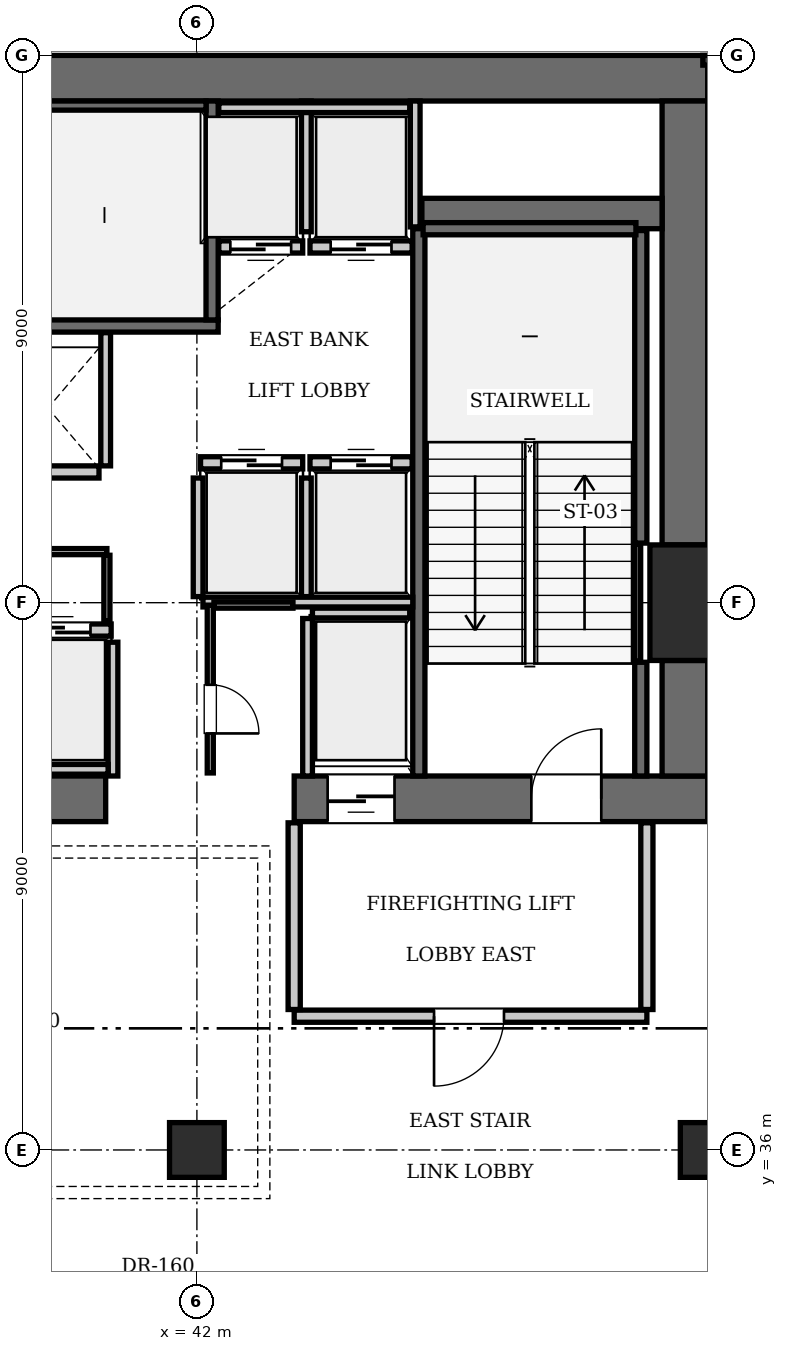
"""IFC4 building model, lengths in metres.
Left out: names, types, materials, properties, quantities, classifications, styles, units other than length and angle.
Written with IfcOpenShell. Run it as: python <this file> out.ifc"""

import sys

from ifc_helpers import new_model, si_unit, direction, frame, frame_2d, origin, origin_2d, place, context, subcontext, project, spatial, rectangle, extrude, element, fill, save


model = new_model("IFC4")
c1 = context("Model", 3, precision=1e-05, world=origin(), true_north=direction((0.0, 1.0)))
c2 = subcontext(c1, "Body", "Model", "MODEL_VIEW")
j1 = project(units=[si_unit("LENGTHUNIT", "METRE"), si_unit("PLANEANGLEUNIT", "RADIAN")], contexts=[c1])
p1 = place(None, origin())
s1 = spatial("IfcSite", under=j1, at=p1, CompositionType="ELEMENT")
p2 = place(p1, origin())
s2 = spatial("IfcBuilding", under=s1, at=p2, CompositionType="ELEMENT")
p3 = place(p2, frame((0.0, 0.0, 122.5)))
s3 = spatial("IfcBuildingStorey", under=s2, at=p3, CompositionType="ELEMENT", Elevation=122.5)
p4 = place(p3, frame((50.4, 45.0, 0.0), z_axis=(0.0, 0.0, 1.0), x_axis=(1.0, 0.0, 0.0)))
e1 = element("IfcColumn", 1, at=p4, inside=s3, PredefinedType="COLUMN", context=c2, shape_type="SweptSolid", body=[
    extrude(rectangle(XDim=1.9, YDim=1.9, at=origin_2d()), origin(), (0.0, 0.0, 1.0), 4.9),
])
p5 = place(p3, frame((25.2, 53.625, 0.0), z_axis=(0.0, 0.0, 1.0), x_axis=(1.0, 0.0, 0.0)))
e2 = element("IfcWall", 2, at=p5, inside=s3, PredefinedType="SHEAR", context=c2, shape_type="SweptSolid", body=[
    extrude(rectangle(XDim=25.2, YDim=0.75, at=frame_2d((12.6, 0.0))), origin(), (0.0, 0.0, 1.0), 4.9),
])
p6 = place(p3, frame((35.1, 41.775, 0.0), z_axis=(0.0, 0.0, 1.0), x_axis=(1.0, 0.0, 0.0)))
e3 = element("IfcWall", 3, at=p6, inside=s3, PredefinedType="SHEAR", context=c2, shape_type="SweptSolid", body=[
    extrude(rectangle(XDim=5.4, YDim=0.75, at=frame_2d((2.7, 0.0))), origin(), (0.0, 0.0, 1.0), 4.9),
])
p7 = place(p3, frame((43.6, 41.775, 0.0), z_axis=(0.0, 0.0, 1.0), x_axis=(1.0, 0.0, 0.0)))
e4 = element("IfcWall", 4, at=p7, inside=s3, PredefinedType="SHEAR", context=c2, shape_type="SweptSolid", body=[
    extrude(rectangle(XDim=6.8, YDim=0.75, at=frame_2d((3.4, 0.0))), origin(), (0.0, 0.0, 1.0), 4.9),
])
p8 = place(p7, frame((3.9, 0.0, 0.0)))
e5 = element("IfcOpeningElement", 5, at=p8, cuts=e4, PredefinedType="OPENING", context=c2, shape_type="SweptSolid", body=[
    extrude(rectangle(XDim=1.15, YDim=2.15, at=frame_2d((0.575, 1.075))), frame((0.0, 0.385, 0.0), z_axis=(0.0, -1.0, 0.0), x_axis=(1.0, 0.0, 0.0)), (0.0, 0.0, 1.0), 0.77),
])
p9 = place(p7, frame((0.55, 0.0, 0.0)))
e6 = element("IfcOpeningElement", 6, at=p9, cuts=e4, PredefinedType="OPENING", context=c2, shape_type="SweptSolid", body=[
    extrude(rectangle(XDim=1.1, YDim=2.2, at=frame_2d((0.55, 1.1))), frame((0.0, 0.385, 0.0), z_axis=(0.0, -1.0, 0.0), x_axis=(1.0, 0.0, 0.0)), (0.0, 0.0, 1.0), 0.77),
])
p10 = place(p3, frame((50.025, 42.15, 0.0), z_axis=(0.0, 0.0, 1.0), x_axis=(0.0, 1.0, 0.0)))
e7 = element("IfcWall", 7, at=p10, inside=s3, PredefinedType="SHEAR", context=c2, shape_type="SweptSolid", body=[
    extrude(rectangle(XDim=1.9, YDim=0.75, at=frame_2d((0.95, 0.0))), origin(), (0.0, 0.0, 1.0), 4.9),
])
p11 = place(p3, frame((50.025, 45.95, 0.0), z_axis=(0.0, 0.0, 1.0), x_axis=(0.0, 1.0, 0.0)))
e8 = element("IfcWall", 8, at=p11, inside=s3, PredefinedType="SHEAR", context=c2, shape_type="SweptSolid", body=[
    extrude(rectangle(XDim=7.3, YDim=0.75, at=frame_2d((3.65, 0.0))), origin(), (0.0, 0.0, 1.0), 4.9),
])
p12 = place(p3, frame((45.7, 51.4, 0.0), z_axis=(0.0, 0.0, 1.0), x_axis=(1.0, 0.0, 0.0)))
e9 = element("IfcWall", 9, at=p12, inside=s3, PredefinedType="SHEAR", context=c2, shape_type="SweptSolid", body=[
    extrude(rectangle(XDim=3.95, YDim=0.5, at=frame_2d((1.975, 0.0))), origin(), (0.0, 0.0, 1.0), 4.9),
])
for number, where, z_axis, x_axis in (
    (10, (42.0, 36.0, 0.0), (0.0, 0.0, 1.0), (1.0, 0.0, 0.0)),
    (11, (50.4, 36.0, 0.0), (0.0, 0.0, 1.0), (1.0, 0.0, 0.0)),
):
    element("IfcColumn", number, at=place(p3, frame(where, z_axis=z_axis, x_axis=x_axis)), inside=s3, PredefinedType="COLUMN", context=c2, shape_type="SweptSolid", body=[
        extrude(rectangle(XDim=0.9, YDim=0.9, at=origin_2d()), origin(), (0.0, 0.0, 1.0), 4.9),
    ])
p13 = place(p3, frame((33.25, 49.55, 0.0), z_axis=(0.0, 0.0, 1.0), x_axis=(1.0, 0.0, 0.0)))
e12 = element("IfcWall", 12, at=p13, inside=s3, PredefinedType="SOLIDWALL", context=c2, shape_type="SweptSolid", body=[
    extrude(rectangle(XDim=9.1, YDim=0.2, at=frame_2d((4.55, 0.0))), origin(), (0.0, 0.0, 1.0), 4.66),
])
p14 = place(p3, frame((42.25, 49.65, 0.0), z_axis=(0.0, 0.0, 1.0), x_axis=(0.0, 1.0, 0.0)))
e13 = element("IfcWall", 13, at=p14, inside=s3, PredefinedType="SOLIDWALL", context=c2, shape_type="SweptSolid", body=[
    extrude(rectangle(XDim=3.6, YDim=0.2, at=frame_2d((1.8, 0.0))), origin(), (0.0, 0.0, 1.0), 4.66),
])
p15 = place(p3, frame((33.45, 53.175, 0.0), z_axis=(0.0, 0.0, 1.0), x_axis=(1.0, 0.0, 0.0)))
e14 = element("IfcWall", 14, at=p15, inside=s3, PredefinedType="SOLIDWALL", context=c2, shape_type="SweptSolid", body=[
    extrude(rectangle(XDim=8.7, YDim=0.15, at=frame_2d((4.35, 0.0))), origin(), (0.0, 0.0, 1.0), 4.66),
])
p16 = place(p3, frame((45.65, 42.15, 0.0), z_axis=(0.0, 0.0, 1.0), x_axis=(0.0, 1.0, 0.0)))
e15 = element("IfcWall", 15, at=p16, inside=s3, PredefinedType="SOLIDWALL", context=c2, shape_type="SweptSolid", body=[
    extrude(rectangle(XDim=9.0, YDim=0.2, at=frame_2d((4.5, 0.0))), origin(), (0.0, 0.0, 1.0), 4.66),
])
p17 = place(p3, frame((49.3, 42.15, 0.0), z_axis=(0.0, 0.0, 1.0), x_axis=(0.0, 1.0, 0.0)))
e16 = element("IfcWall", 16, at=p17, inside=s3, PredefinedType="SOLIDWALL", context=c2, shape_type="SweptSolid", body=[
    extrude(rectangle(XDim=1.87, YDim=0.2, at=frame_2d((0.935, 0.0))), origin(), (0.0, 0.0, 1.0), 4.66),
])
p18 = place(p3, frame((49.3, 45.98, 0.0), z_axis=(0.0, 0.0, 1.0), x_axis=(0.0, 1.0, 0.0)))
e17 = element("IfcWall", 17, at=p18, inside=s3, PredefinedType="SOLIDWALL", context=c2, shape_type="SweptSolid", body=[
    extrude(rectangle(XDim=5.14, YDim=0.2, at=frame_2d((2.57, 0.0))), origin(), (0.0, 0.0, 1.0), 4.66),
])
p19 = place(p3, frame((45.72, 51.15, 0.0), z_axis=(0.0, 0.0, 1.0), x_axis=(1.0, 0.0, 0.0)))
e18 = element("IfcWall", 18, at=p19, inside=s3, PredefinedType="SOLIDWALL", context=c2, shape_type="SweptSolid", body=[
    extrude(rectangle(XDim=3.5, YDim=0.2, at=frame_2d((1.75, 0.0))), origin(), (0.0, 0.0, 1.0), 4.66),
])
p20 = place(p3, frame((49.248, 44.04, 0.0), z_axis=(0.0, 0.0, 1.0), x_axis=(0.0, 1.0, 0.0)))
e19 = element("IfcWall", 19, at=p20, inside=s3, PredefinedType="SOLIDWALL", context=c2, shape_type="SweptSolid", body=[
    extrude(rectangle(XDim=1.92, YDim=0.1, at=frame_2d((0.96, 0.0))), origin(), (0.0, 0.0, 1.0), 4.66),
])
p21 = place(p3, frame((42.06, 47.3, 0.0), z_axis=(0.0, 0.0, 1.0), x_axis=(1.0, 0.0, 0.0)))
e20 = element("IfcWall", 20, at=p21, inside=s3, PredefinedType="SOLIDWALL", context=c2, shape_type="SweptSolid", body=[
    extrude(rectangle(XDim=1.68, YDim=0.2, at=frame_2d((0.84, 0.0))), origin(), (0.0, 0.0, 1.0), 4.66),
])
p22 = place(p21, frame((0.34, 0.0, 0.0)))
e21 = element("IfcOpeningElement", 21, at=p22, cuts=e20, PredefinedType="OPENING", context=c2, shape_type="SweptSolid", body=[
    extrude(rectangle(XDim=1.0, YDim=2.15, at=frame_2d((0.5, 1.075))), frame((0.0, 0.11, 0.0), z_axis=(0.0, -1.0, 0.0), x_axis=(1.0, 0.0, 0.0)), (0.0, 0.0, 1.0), 0.22),
])
p23 = place(p3, frame((43.86, 47.3, 0.0), z_axis=(0.0, 0.0, 1.0), x_axis=(1.0, 0.0, 0.0)))
e22 = element("IfcWall", 22, at=p23, inside=s3, PredefinedType="SOLIDWALL", context=c2, shape_type="SweptSolid", body=[
    extrude(rectangle(XDim=1.68, YDim=0.2, at=frame_2d((0.84, 0.0))), origin(), (0.0, 0.0, 1.0), 4.66),
])
p24 = place(p23, frame((0.34, 0.0, 0.0)))
e23 = element("IfcOpeningElement", 23, at=p24, cuts=e22, PredefinedType="OPENING", context=c2, shape_type="SweptSolid", body=[
    extrude(rectangle(XDim=1.0, YDim=2.15, at=frame_2d((0.5, 1.075))), frame((0.0, 0.11, 0.0), z_axis=(0.0, -1.0, 0.0), x_axis=(1.0, 0.0, 0.0)), (0.0, 0.0, 1.0), 0.22),
])
p25 = place(p3, frame((42.36, 50.85, 0.0), z_axis=(0.0, 0.0, 1.0), x_axis=(1.0, 0.0, 0.0)))
e24 = element("IfcWall", 24, at=p25, inside=s3, PredefinedType="SOLIDWALL", context=c2, shape_type="SweptSolid", body=[
    extrude(rectangle(XDim=1.38, YDim=0.2, at=frame_2d((0.69, 0.0))), origin(), (0.0, 0.0, 1.0), 4.66),
])
p26 = place(p25, frame((0.19, 0.0, 0.0)))
e25 = element("IfcOpeningElement", 25, at=p26, cuts=e24, PredefinedType="OPENING", context=c2, shape_type="SweptSolid", body=[
    extrude(rectangle(XDim=1.0, YDim=2.15, at=frame_2d((0.5, 1.075))), frame((0.0, 0.11, 0.0), z_axis=(0.0, -1.0, 0.0), x_axis=(1.0, 0.0, 0.0)), (0.0, 0.0, 1.0), 0.22),
])
p27 = place(p3, frame((43.86, 50.85, 0.0), z_axis=(0.0, 0.0, 1.0), x_axis=(1.0, 0.0, 0.0)))
e26 = element("IfcWall", 26, at=p27, inside=s3, PredefinedType="SOLIDWALL", context=c2, shape_type="SweptSolid", body=[
    extrude(rectangle(XDim=1.68, YDim=0.2, at=frame_2d((0.84, 0.0))), origin(), (0.0, 0.0, 1.0), 4.66),
])
p28 = place(p27, frame((0.34, 0.0, 0.0)))
e27 = element("IfcOpeningElement", 27, at=p28, cuts=e26, PredefinedType="OPENING", context=c2, shape_type="SweptSolid", body=[
    extrude(rectangle(XDim=1.0, YDim=2.15, at=frame_2d((0.5, 1.075))), frame((0.0, 0.11, 0.0), z_axis=(0.0, -1.0, 0.0), x_axis=(1.0, 0.0, 0.0)), (0.0, 0.0, 1.0), 0.22),
])
p29 = place(p3, frame((38.91, 44.55, 0.0), z_axis=(0.0, 0.0, 1.0), x_axis=(1.0, 0.0, 0.0)))
e28 = element("IfcWall", 28, at=p29, inside=s3, PredefinedType="SOLIDWALL", context=c2, shape_type="SweptSolid", body=[
    extrude(rectangle(XDim=1.68, YDim=0.2, at=frame_2d((0.84, 0.0))), origin(), (0.0, 0.0, 1.0), 4.66),
])
p30 = place(p29, frame((0.34, 0.0, 0.0)))
e29 = element("IfcOpeningElement", 29, at=p30, cuts=e28, PredefinedType="OPENING", context=c2, shape_type="SweptSolid", body=[
    extrude(rectangle(XDim=1.0, YDim=2.15, at=frame_2d((0.5, 1.075))), frame((0.0, 0.11, 0.0), z_axis=(0.0, -1.0, 0.0), x_axis=(1.0, 0.0, 0.0)), (0.0, 0.0, 1.0), 0.22),
])
p31 = place(p3, frame((38.71, 47.15, 0.0), z_axis=(0.0, 0.0, 1.0), x_axis=(1.0, 0.0, 0.0)))
e30 = element("IfcWall", 30, at=p31, inside=s3, PredefinedType="SOLIDWALL", context=c2, shape_type="SweptSolid", body=[
    extrude(rectangle(XDim=1.68, YDim=0.2, at=frame_2d((0.84, 0.0))), origin(), (0.0, 0.0, 1.0), 4.66),
])
p32 = place(p3, frame((43.9, 44.83, 0.0), z_axis=(0.0, 0.0, 1.0), x_axis=(1.0, 0.0, 0.0)))
e31 = element("IfcWall", 31, at=p32, inside=s3, PredefinedType="SOLIDWALL", context=c2, shape_type="SweptSolid", body=[
    extrude(rectangle(XDim=1.6, YDim=0.16, at=frame_2d((0.8, 0.0))), origin(), (0.0, 0.0, 1.0), 4.66),
])
p33 = place(p3, frame((43.82, 42.15, 0.0), z_axis=(0.0, 0.0, 1.0), x_axis=(0.0, 1.0, 0.0)))
e32 = element("IfcWall", 32, at=p33, inside=s3, PredefinedType="SOLIDWALL", context=c2, shape_type="SweptSolid", body=[
    extrude(rectangle(XDim=2.59, YDim=0.16, at=frame_2d((1.295, 0.0))), origin(), (0.0, 0.0, 1.0), 4.66),
])
for number, where, z_axis, x_axis in (
    (33, (42.02, 45.1, 0.0), (0.0, 0.0, 1.0), (0.0, 1.0, 0.0)),
    (34, (43.8, 45.1, 0.0), (0.0, 0.0, 1.0), (0.0, 1.0, 0.0)),
):
    element("IfcWall", number, at=place(p3, frame(where, z_axis=z_axis, x_axis=x_axis)), inside=s3, PredefinedType="SOLIDWALL", context=c2, shape_type="SweptSolid", body=[
        extrude(rectangle(XDim=1.95, YDim=0.16, at=frame_2d((0.975, 0.0))), origin(), (0.0, 0.0, 1.0), 4.66),
    ])
p34 = place(p3, frame((42.1, 45.01, 0.0), z_axis=(0.0, 0.0, 1.0), x_axis=(1.0, 0.0, 0.0)))
e35 = element("IfcWall", 35, at=p34, inside=s3, PredefinedType="SOLIDWALL", context=c2, shape_type="SweptSolid", body=[
    extrude(rectangle(XDim=3.45, YDim=0.16, at=frame_2d((1.725, 0.0))), origin(), (0.0, 0.0, 1.0), 4.66),
])
p35 = place(p3, frame((45.59, 51.18, 0.0), z_axis=(0.0, 0.0, 1.0), x_axis=(0.0, 1.0, 0.0)))
e36 = element("IfcWall", 36, at=p35, inside=s3, PredefinedType="SOLIDWALL", context=c2, shape_type="SweptSolid", body=[
    extrude(rectangle(XDim=2.07, YDim=0.16, at=frame_2d((1.035, 0.0))), origin(), (0.0, 0.0, 1.0), 4.66),
])
p36 = place(p3, frame((43.8, 51.1, 0.0), z_axis=(0.0, 0.0, 1.0), x_axis=(0.0, 1.0, 0.0)))
e37 = element("IfcWall", 37, at=p36, inside=s3, PredefinedType="SOLIDWALL", context=c2, shape_type="SweptSolid", body=[
    extrude(rectangle(XDim=2.15, YDim=0.16, at=frame_2d((1.075, 0.0))), origin(), (0.0, 0.0, 1.0), 4.66),
])
p37 = place(p3, frame((42.36, 53.14, 0.0), z_axis=(0.0, 0.0, 1.0), x_axis=(1.0, 0.0, 0.0)))
e38 = element("IfcWall", 38, at=p37, inside=s3, PredefinedType="SOLIDWALL", context=c2, shape_type="SweptSolid", body=[
    extrude(rectangle(XDim=3.14, YDim=0.16, at=frame_2d((1.57, 0.0))), origin(), (0.0, 0.0, 1.0), 4.66),
])
p38 = place(p3, frame((40.62, 42.15, 0.0), z_axis=(0.0, 0.0, 1.0), x_axis=(0.0, 1.0, 0.0)))
e39 = element("IfcWall", 39, at=p38, inside=s3, PredefinedType="SOLIDWALL", context=c2, shape_type="SweptSolid", body=[
    extrude(rectangle(XDim=2.2, YDim=0.16, at=frame_2d((1.1, 0.0))), origin(), (0.0, 0.0, 1.0), 4.66),
])
p39 = place(p3, frame((35.52, 42.26, 0.0), z_axis=(0.0, 0.0, 1.0), x_axis=(1.0, 0.0, 0.0)))
e40 = element("IfcWall", 40, at=p39, inside=s3, PredefinedType="SOLIDWALL", context=c2, shape_type="SweptSolid", body=[
    extrude(rectangle(XDim=5.02, YDim=0.16, at=frame_2d((2.51, 0.0))), origin(), (0.0, 0.0, 1.0), 4.66),
])
p40 = place(p3, frame((40.5, 47.25, 0.0), z_axis=(0.0, 0.0, 1.0), x_axis=(0.0, 1.0, 0.0)))
e41 = element("IfcWall", 41, at=p40, inside=s3, PredefinedType="SOLIDWALL", context=c2, shape_type="SweptSolid", body=[
    extrude(rectangle(XDim=2.19, YDim=0.16, at=frame_2d((1.095, 0.0))), origin(), (0.0, 0.0, 1.0), 4.66),
])
p41 = place(p3, frame((43.6, 38.2, 0.0), z_axis=(0.0, 0.0, 1.0), x_axis=(1.0, 0.0, 0.0)))
e42 = element("IfcWall", 42, at=p41, inside=s3, PredefinedType="PARTITIONING", context=c2, shape_type="SweptSolid", body=[
    extrude(rectangle(XDim=5.8, YDim=0.2, at=frame_2d((2.9, 0.0))), origin(), (0.0, 0.0, 1.0), 4.66),
])
p42 = place(p41, frame((2.3, 0.0, 0.0)))
e43 = element("IfcOpeningElement", 43, at=p42, cuts=e42, PredefinedType="OPENING", context=c2, shape_type="SweptSolid", body=[
    extrude(rectangle(XDim=1.15, YDim=2.15, at=frame_2d((0.575, 1.075))), frame((0.0, 0.11, 0.0), z_axis=(0.0, -1.0, 0.0), x_axis=(1.0, 0.0, 0.0)), (0.0, 0.0, 1.0), 0.22),
])
for number, where, z_axis, x_axis in (
    (44, (43.6, 38.31, 0.0), (0.0, 0.0, 1.0), (0.0, 1.0, 0.0)),
    (45, (49.4, 38.31, 0.0), (0.0, 0.0, 1.0), (0.0, 1.0, 0.0)),
):
    element("IfcWall", number, at=place(p3, frame(where, z_axis=z_axis, x_axis=x_axis)), inside=s3, PredefinedType="PARTITIONING", context=c2, shape_type="SweptSolid", body=[
        extrude(rectangle(XDim=3.07, YDim=0.2, at=frame_2d((1.535, 0.0))), origin(), (0.0, 0.0, 1.0), 4.66),
    ])
p43 = place(p3, frame((38.02, 45.84, 0.0), z_axis=(0.0, 0.0, 1.0), x_axis=(1.0, 0.0, 0.0)))
e46 = element("IfcWall", 46, at=p43, inside=s3, PredefinedType="PARTITIONING", context=c2, shape_type="SweptSolid", body=[
    extrude(rectangle(XDim=2.5, YDim=0.1, at=frame_2d((1.25, 0.0))), origin(), (0.0, 0.0, 1.0), 4.66),
])
p44 = place(p43, frame((0.75, 0.0, 0.0)))
e47 = element("IfcOpeningElement", 47, at=p44, cuts=e46, PredefinedType="OPENING", context=c2, shape_type="SweptSolid", body=[
    extrude(rectangle(XDim=0.8, YDim=2.05, at=frame_2d((0.4, 1.025))), frame((0.0, 0.06, 0.0), z_axis=(0.0, -1.0, 0.0), x_axis=(1.0, 0.0, 0.0)), (0.0, 0.0, 1.0), 0.12),
])
p45 = place(p3, frame((40.52, 44.7, 0.0), z_axis=(0.0, 0.0, 1.0), x_axis=(0.0, 1.0, 0.0)))
e48 = element("IfcWall", 48, at=p45, inside=s3, PredefinedType="PARTITIONING", context=c2, shape_type="SweptSolid", body=[
    extrude(rectangle(XDim=1.08, YDim=0.1, at=frame_2d((0.54, 0.0))), origin(), (0.0, 0.0, 1.0), 4.66),
])
p46 = place(p3, frame((42.22, 42.2, 0.0), z_axis=(0.0, 0.0, 1.0), x_axis=(0.0, 1.0, 0.0)))
e49 = element("IfcWall", 49, at=p46, inside=s3, PredefinedType="PARTITIONING", context=c2, shape_type="SweptSolid", body=[
    extrude(rectangle(XDim=2.76, YDim=0.1, at=frame_2d((1.38, 0.0))), origin(), (0.0, 0.0, 1.0), 4.66),
])
p47 = place(p46, frame((0.65, 0.0, 0.0)))
e50 = element("IfcOpeningElement", 50, at=p47, cuts=e49, PredefinedType="OPENING", context=c2, shape_type="SweptSolid", body=[
    extrude(rectangle(XDim=0.8, YDim=2.05, at=frame_2d((0.4, 1.025))), frame((0.0, 0.06, 0.0), z_axis=(0.0, -1.0, 0.0), x_axis=(1.0, 0.0, 0.0)), (0.0, 0.0, 1.0), 0.12),
])
p48 = place(p3, frame((42.28, 44.96, 0.0), z_axis=(0.0, 0.0, 1.0), x_axis=(1.0, 0.0, 0.0)))
e51 = element("IfcWall", 51, at=p48, inside=s3, PredefinedType="PARTITIONING", context=c2, shape_type="SweptSolid", body=[
    extrude(rectangle(XDim=1.3, YDim=0.1, at=frame_2d((0.65, 0.0))), origin(), (0.0, 0.0, 1.0), 4.66),
])
p49 = place(p8, origin())
e52 = element("IfcDoor", 52, at=p49, inside=s3, OperationType="SINGLE_SWING_RIGHT", PredefinedType="DOOR", context=c2, shape_type="SweptSolid", body=[
    extrude(rectangle(XDim=1.15, YDim=2.15, at=frame_2d((0.575, 1.075))), frame((0.0, 0.025, 0.0), z_axis=(0.0, -1.0, 0.0), x_axis=(1.0, 0.0, 0.0)), (0.0, 0.0, 1.0), 0.05),
])
fill(e5, e52)
p50 = place(p22, origin())
e53 = element("IfcDoor", 53, at=p50, inside=s3, OperationType="SLIDING_TO_LEFT", PredefinedType="DOOR", context=c2, shape_type="SweptSolid", body=[
    extrude(rectangle(XDim=1.0, YDim=2.15, at=frame_2d((0.5, 1.075))), frame((0.0, 0.025, 0.0), z_axis=(0.0, -1.0, 0.0), x_axis=(1.0, 0.0, 0.0)), (0.0, 0.0, 1.0), 0.05),
])
fill(e21, e53)
p51 = place(p24, origin())
e54 = element("IfcDoor", 54, at=p51, inside=s3, OperationType="SLIDING_TO_LEFT", PredefinedType="DOOR", context=c2, shape_type="SweptSolid", body=[
    extrude(rectangle(XDim=1.0, YDim=2.15, at=frame_2d((0.5, 1.075))), frame((0.0, 0.025, 0.0), z_axis=(0.0, -1.0, 0.0), x_axis=(1.0, 0.0, 0.0)), (0.0, 0.0, 1.0), 0.05),
])
fill(e23, e54)
p52 = place(p26, frame((1.0, 0.0, 0.0), z_axis=(0.0, 0.0, 1.0), x_axis=(-1.0, 0.0, 0.0)))
e55 = element("IfcDoor", 55, at=p52, inside=s3, OperationType="SLIDING_TO_LEFT", PredefinedType="DOOR", context=c2, shape_type="SweptSolid", body=[
    extrude(rectangle(XDim=1.0, YDim=2.15, at=frame_2d((0.5, 1.075))), frame((0.0, 0.025, 0.0), z_axis=(0.0, -1.0, 0.0), x_axis=(1.0, 0.0, 0.0)), (0.0, 0.0, 1.0), 0.05),
])
fill(e25, e55)
p53 = place(p28, frame((1.0, 0.0, 0.0), z_axis=(0.0, 0.0, 1.0), x_axis=(-1.0, 0.0, 0.0)))
e56 = element("IfcDoor", 56, at=p53, inside=s3, OperationType="SLIDING_TO_LEFT", PredefinedType="DOOR", context=c2, shape_type="SweptSolid", body=[
    extrude(rectangle(XDim=1.0, YDim=2.15, at=frame_2d((0.5, 1.075))), frame((0.0, 0.025, 0.0), z_axis=(0.0, -1.0, 0.0), x_axis=(1.0, 0.0, 0.0)), (0.0, 0.0, 1.0), 0.05),
])
fill(e27, e56)
p54 = place(p30, origin())
e57 = element("IfcDoor", 57, at=p54, inside=s3, OperationType="SLIDING_TO_LEFT", PredefinedType="DOOR", context=c2, shape_type="SweptSolid", body=[
    extrude(rectangle(XDim=1.0, YDim=2.15, at=frame_2d((0.5, 1.075))), frame((0.0, 0.025, 0.0), z_axis=(0.0, -1.0, 0.0), x_axis=(1.0, 0.0, 0.0)), (0.0, 0.0, 1.0), 0.05),
])
fill(e29, e57)
p55 = place(p9, frame((1.1, 0.0, 0.0), z_axis=(0.0, 0.0, 1.0), x_axis=(-1.0, 0.0, 0.0)))
e58 = element("IfcDoor", 58, at=p55, inside=s3, OperationType="SLIDING_TO_LEFT", PredefinedType="DOOR", context=c2, shape_type="SweptSolid", body=[
    extrude(rectangle(XDim=1.1, YDim=2.2, at=frame_2d((0.55, 1.1))), frame((0.0, 0.025, 0.0), z_axis=(0.0, -1.0, 0.0), x_axis=(1.0, 0.0, 0.0)), (0.0, 0.0, 1.0), 0.05),
])
fill(e6, e58)
p56 = place(p42, frame((1.15, 0.0, 0.0), z_axis=(0.0, 0.0, 1.0), x_axis=(-1.0, 0.0, 0.0)))
e59 = element("IfcDoor", 59, at=p56, inside=s3, OperationType="SINGLE_SWING_RIGHT", PredefinedType="DOOR", context=c2, shape_type="SweptSolid", body=[
    extrude(rectangle(XDim=1.15, YDim=2.15, at=frame_2d((0.575, 1.075))), frame((0.0, 0.025, 0.0), z_axis=(0.0, -1.0, 0.0), x_axis=(1.0, 0.0, 0.0)), (0.0, 0.0, 1.0), 0.05),
])
fill(e43, e59)
p57 = place(p47, frame((0.8, 0.0, 0.0), z_axis=(0.0, 0.0, 1.0), x_axis=(-1.0, 0.0, 0.0)))
e60 = element("IfcDoor", 60, at=p57, inside=s3, OperationType="SINGLE_SWING_RIGHT", PredefinedType="DOOR", context=c2, shape_type="SweptSolid", body=[
    extrude(rectangle(XDim=0.8, YDim=2.05, at=frame_2d((0.4, 1.025))), frame((0.0, 0.025, 0.0), z_axis=(0.0, -1.0, 0.0), x_axis=(1.0, 0.0, 0.0)), (0.0, 0.0, 1.0), 0.05),
])
fill(e50, e60)
save(model, sys.argv[1])
